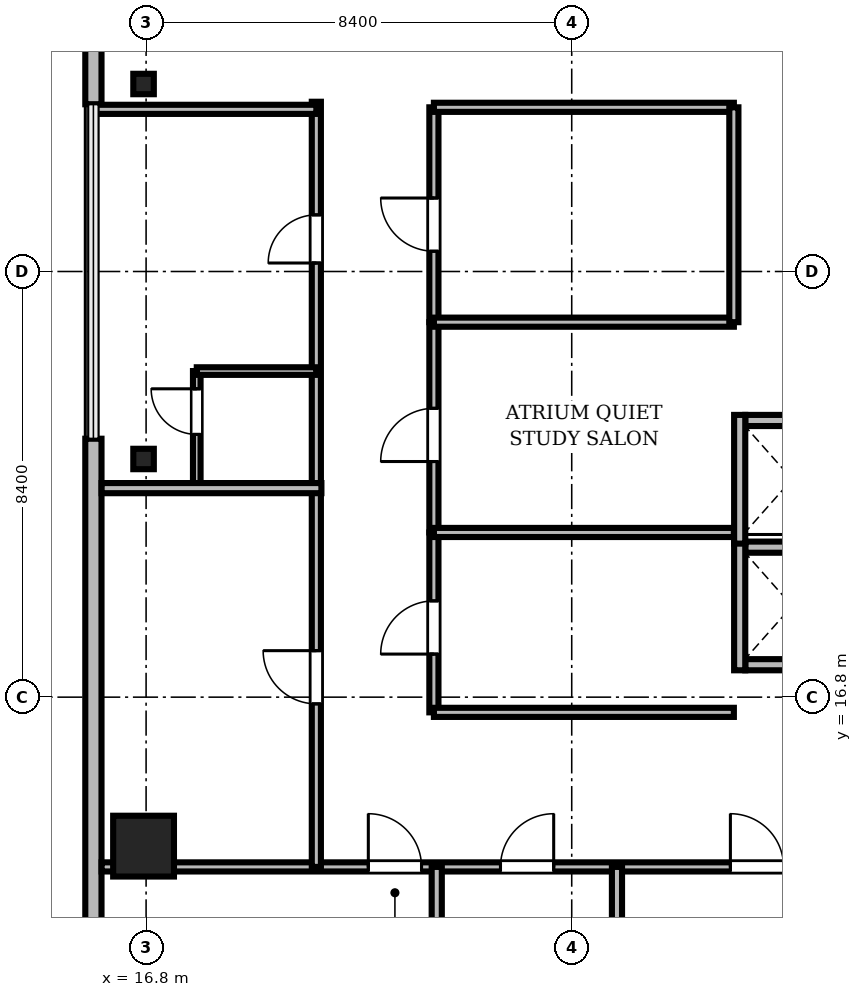
"""IFC4 building model, lengths in metres.
Left out: names, types, materials, properties, quantities, classifications, styles, units other than length and angle.
Written with IfcOpenShell. Run it as: python <this file> out.ifc"""

import sys

from ifc_helpers import new_model, si_unit, direction, frame, frame_2d, origin, origin_2d, place, context, subcontext, project, spatial, rectangle, i_section, extrude, source, transform, mapped, element, fill, save


model = new_model("IFC4")
c1 = context("Model", 3, precision=1e-05, world=origin(), true_north=direction((0.0, 1.0)))
c2 = subcontext(c1, "Body", "Model", "MODEL_VIEW")
j1 = project(units=[si_unit("LENGTHUNIT", "METRE"), si_unit("PLANEANGLEUNIT", "RADIAN")], contexts=[c1])
p1 = place(None, origin())
s1 = spatial("IfcSite", under=j1, at=p1, CompositionType="ELEMENT")
p2 = place(p1, origin())
s2 = spatial("IfcBuilding", under=s1, at=p2, CompositionType="ELEMENT")
p3 = place(p2, frame((0.0, 0.0, 242.7)))
s3 = spatial("IfcBuildingStorey", under=s2, at=p3, CompositionType="ELEMENT", Elevation=242.7)
m1 = source(origin(), c2, "Body", "SweptSolid", [
    extrude(rectangle(XDim=1.2, YDim=1.2, at=origin_2d()), origin(), (0.0, 0.0, 1.0), 3.73),
])
p4 = place(p3, frame((16.75, 13.86, 0.0), z_axis=(0.0, 0.0, 1.0), x_axis=(1.0, 0.0, 0.0)))
e1 = element("IfcColumn", 1, at=p4, inside=s3, PredefinedType="COLUMN", context=c2, shape_type="MappedRepresentation", body=[
    mapped(m1, transform((0.0, 0.0, 0.0), scale=1.0)),
])
m2 = source(origin(), c2, "Body", "SweptSolid", [
    extrude(i_section(OverallWidth=0.405, OverallDepth=0.403, WebThickness=0.018, FlangeThickness=0.028, FilletRadius=0.015, at=origin_2d()), origin(), (0.0, 0.0, 1.0), 3.73),
])
for number, where, z_axis, x_axis in (
    (2, (16.75, 28.9, 0.0), (0.0, 0.0, 1.0), (1.0, 0.0, 0.0)),
    (3, (16.75, 21.5, 0.0), (0.0, 0.0, 1.0), (1.0, 0.0, 0.0)),
):
    element("IfcColumn", number, at=place(p3, frame(where, z_axis=z_axis, x_axis=x_axis)), inside=s3, PredefinedType="COLUMN", context=c2, shape_type="MappedRepresentation", body=[
        mapped(m2, transform((0.0, 0.0, 0.0), scale=1.0)),
    ])
m3 = source(origin(), c2, "Body", "SweptSolid", [
    extrude(rectangle(XDim=15.6, YDim=0.32, at=frame_2d((7.8, 0.0))), origin(), (0.0, 0.0, 1.0), 3.73),
])
p5 = place(p3, frame((15.76, 44.1, 0.0), z_axis=(0.0, 0.0, 1.0), x_axis=(0.0, -1.0, 0.0)))
e4 = element("IfcWall", 4, at=p5, inside=s3, PredefinedType="SOLIDWALL", context=c2, shape_type="MappedRepresentation", body=[
    mapped(m3, transform((0.0, 0.0, 0.0), scale=1.0)),
])
m4 = source(origin(), c2, "Body", "SweptSolid", [
    extrude(rectangle(XDim=1.4, YDim=2.3, at=frame_2d((0.7, 1.15))), frame((0.0, 0.17, 0.0), z_axis=(0.0, -1.0, 0.0), x_axis=(1.0, 0.0, 0.0)), (0.0, 0.0, 1.0), 0.34),
])
p6 = place(p5, frame((9.61, 0.0, 0.0)))
e5 = element("IfcOpeningElement", 5, at=p6, cuts=e4, PredefinedType="OPENING", context=c2, shape_type="MappedRepresentation", body=[
    mapped(m4, transform((0.0, 0.0, 0.0), scale=1.0)),
])
m5 = source(origin(), c2, "Body", "SweptSolid", [
    extrude(rectangle(XDim=2.8, YDim=2.4, at=frame_2d((1.4, 1.2))), frame((0.0, 0.17, 0.0), z_axis=(0.0, -1.0, 0.0), x_axis=(1.0, 0.0, 0.0)), (0.0, 0.0, 1.0), 0.34),
])
p7 = place(p5, frame((2.705, 0.0, 0.72)))
e6 = element("IfcOpeningElement", 6, at=p7, cuts=e4, PredefinedType="OPENING", context=c2, shape_type="MappedRepresentation", body=[
    mapped(m5, transform((0.0, 0.0, 0.0), scale=1.0)),
])
m6 = source(origin(), c2, "Body", "SweptSolid", [
    extrude(rectangle(XDim=15.6, YDim=0.32, at=frame_2d((7.8, 0.0))), origin(), (0.0, 0.0, 1.0), 3.73),
])
p8 = place(p3, frame((15.76, 21.9, 0.0), z_axis=(0.0, 0.0, 1.0), x_axis=(0.0, -1.0, 0.0)))
e7 = element("IfcWall", 7, at=p8, inside=s3, PredefinedType="SOLIDWALL", context=c2, shape_type="MappedRepresentation", body=[
    mapped(m6, transform((0.0, 0.0, 0.0), scale=1.0)),
])
p9 = place(p8, frame((10.095, 0.0, 0.72)))
e8 = element("IfcOpeningElement", 8, at=p9, cuts=e7, PredefinedType="OPENING", context=c2, shape_type="MappedRepresentation", body=[
    mapped(m5, transform((0.0, 0.0, 0.0), scale=1.0)),
])
m7 = source(origin(), c2, "Body", "SweptSolid", [
    extrude(rectangle(XDim=1.85, YDim=0.22, at=frame_2d((0.925, 0.0))), origin(), (0.0, 0.0, 1.0), 3.73),
])
for number, where, z_axis, x_axis in (
    (9, (28.625, 17.44, 0.0), (0.0, 0.0, 1.0), (1.0, 0.0, 0.0)),
    (10, (28.625, 19.76, 0.0), (0.0, 0.0, 1.0), (1.0, 0.0, 0.0)),
):
    element("IfcWall", number, at=place(p3, frame(where, z_axis=z_axis, x_axis=x_axis)), inside=s3, PredefinedType="SOLIDWALL", context=c2, shape_type="MappedRepresentation", body=[
        mapped(m7, transform((0.0, 0.0, 0.0), scale=1.0)),
    ])
m8 = source(origin(), c2, "Body", "SweptSolid", [
    extrude(rectangle(XDim=2.54, YDim=0.22, at=frame_2d((1.27, 0.0))), origin(), (0.0, 0.0, 1.0), 3.73),
])
p10 = place(p3, frame((28.515, 17.33, 0.0), z_axis=(0.0, 0.0, 1.0), x_axis=(0.0, 1.0, 0.0)))
e11 = element("IfcWall", 11, at=p10, inside=s3, PredefinedType="SOLIDWALL", context=c2, shape_type="MappedRepresentation", body=[
    mapped(m8, transform((0.0, 0.0, 0.0), scale=1.0)),
])
p11 = place(p3, frame((28.625, 22.26, 0.0), z_axis=(0.0, 0.0, 1.0), x_axis=(1.0, 0.0, 0.0)))
e12 = element("IfcWall", 12, at=p11, inside=s3, PredefinedType="SOLIDWALL", context=c2, shape_type="MappedRepresentation", body=[
    mapped(m7, transform((0.0, 0.0, 0.0), scale=1.0)),
])
p12 = place(p3, frame((28.515, 19.83, 0.0), z_axis=(0.0, 0.0, 1.0), x_axis=(0.0, 1.0, 0.0)))
e13 = element("IfcWall", 13, at=p12, inside=s3, PredefinedType="SOLIDWALL", context=c2, shape_type="MappedRepresentation", body=[
    mapped(m8, transform((0.0, 0.0, 0.0), scale=1.0)),
])
m9 = source(origin(), c2, "Body", "SweptSolid", [
    extrude(rectangle(XDim=46.156, YDim=0.18, at=frame_2d((23.078, 0.0))), origin(), (0.0, 0.0, 1.0), 2.972),
])
p13 = place(p3, frame((15.922, 13.45, 0.0), z_axis=(0.0, 0.0, 1.0), x_axis=(1.0, 0.0, 0.0)))
e14 = element("IfcWall", 14, at=p13, inside=s3, PredefinedType="PARTITIONING", context=c2, shape_type="MappedRepresentation", body=[
    mapped(m9, transform((0.0, 0.0, 0.0), scale=1.0)),
])
m10 = source(origin(), c2, "Body", "SweptSolid", [
    extrude(rectangle(XDim=1.05, YDim=2.2, at=frame_2d((0.525, 1.1))), frame((0.0, 0.1, 0.0), z_axis=(0.0, -1.0, 0.0), x_axis=(1.0, 0.0, 0.0)), (0.0, 0.0, 1.0), 0.2),
])
p14 = place(p13, frame((5.264, 0.0, 0.0)))
e15 = element("IfcOpeningElement", 15, at=p14, cuts=e14, PredefinedType="OPENING", context=c2, shape_type="MappedRepresentation", body=[
    mapped(m10, transform((0.0, 0.0, 0.0), scale=1.0)),
])
p15 = place(p13, frame((7.872, 0.0, 0.0)))
e16 = element("IfcOpeningElement", 16, at=p15, cuts=e14, PredefinedType="OPENING", context=c2, shape_type="MappedRepresentation", body=[
    mapped(m10, transform((0.0, 0.0, 0.0), scale=1.0)),
])
p16 = place(p13, frame((12.409, 0.0, 0.0)))
e17 = element("IfcOpeningElement", 17, at=p16, cuts=e14, PredefinedType="OPENING", context=c2, shape_type="MappedRepresentation", body=[
    mapped(m10, transform((0.0, 0.0, 0.0), scale=1.0)),
])
m11 = source(origin(), c2, "Body", "SweptSolid", [
    extrude(rectangle(XDim=0.95, YDim=2.15, at=frame_2d((0.475, 1.075))), frame((0.0, 0.1, 0.0), z_axis=(0.0, -1.0, 0.0), x_axis=(1.0, 0.0, 0.0)), (0.0, 0.0, 1.0), 0.2),
])
p17 = place(p13, frame((18.691, 0.0, 0.0)))
e18 = element("IfcOpeningElement", 18, at=p17, cuts=e14, PredefinedType="OPENING", context=c2, shape_type="MappedRepresentation", body=[
    mapped(m11, transform((0.0, 0.0, 0.0), scale=1.0)),
])
p18 = place(p13, frame((23.518, 0.0, 0.0)))
e19 = element("IfcOpeningElement", 19, at=p18, cuts=e14, PredefinedType="OPENING", context=c2, shape_type="MappedRepresentation", body=[
    mapped(m11, transform((0.0, 0.0, 0.0), scale=1.0)),
])
p19 = place(p13, frame((28.1, 0.0, 0.0)))
e20 = element("IfcOpeningElement", 20, at=p19, cuts=e14, PredefinedType="OPENING", context=c2, shape_type="MappedRepresentation", body=[
    mapped(m10, transform((0.0, 0.0, 0.0), scale=1.0)),
])
p20 = place(p13, frame((32.998, 0.0, 0.0)))
e21 = element("IfcOpeningElement", 21, at=p20, cuts=e14, PredefinedType="OPENING", context=c2, shape_type="MappedRepresentation", body=[
    mapped(m10, transform((0.0, 0.0, 0.0), scale=1.0)),
])
m12 = source(origin(), c2, "Body", "SweptSolid", [
    extrude(rectangle(XDim=15.1, YDim=0.18, at=frame_2d((7.55, 0.0))), origin(), (0.0, 0.0, 1.0), 3.172),
])
p21 = place(p3, frame((20.16, 13.45, 0.0), z_axis=(0.0, 0.0, 1.0), x_axis=(0.0, 1.0, 0.0)))
e22 = element("IfcWall", 22, at=p21, inside=s3, PredefinedType="PARTITIONING", context=c2, shape_type="MappedRepresentation", body=[
    mapped(m12, transform((0.0, 0.0, 0.0), scale=1.0)),
])
p22 = place(p21, frame((3.218, 0.0, 0.0)))
e23 = element("IfcOpeningElement", 23, at=p22, cuts=e22, PredefinedType="OPENING", context=c2, shape_type="MappedRepresentation", body=[
    mapped(m10, transform((0.0, 0.0, 0.0), scale=1.0)),
])
p23 = place(p21, frame((11.917, 0.0, 0.0)))
e24 = element("IfcOpeningElement", 24, at=p23, cuts=e22, PredefinedType="OPENING", context=c2, shape_type="MappedRepresentation", body=[
    mapped(m11, transform((0.0, 0.0, 0.0), scale=1.0)),
])
m13 = source(origin(), c2, "Body", "SweptSolid", [
    extrude(rectangle(XDim=4.24, YDim=0.18, at=frame_2d((2.12, 0.0))), origin(), (0.0, 0.0, 1.0), 3.172),
])
p24 = place(p3, frame((22.48, 24.2, 0.0), z_axis=(0.0, 0.0, 1.0), x_axis=(0.0, 1.0, 0.0)))
e25 = element("IfcWall", 25, at=p24, inside=s3, PredefinedType="PARTITIONING", context=c2, shape_type="MappedRepresentation", body=[
    mapped(m13, transform((0.0, 0.0, 0.0), scale=1.0)),
])
p25 = place(p24, frame((1.4, 0.0, 0.0)))
e26 = element("IfcOpeningElement", 26, at=p25, cuts=e25, PredefinedType="OPENING", context=c2, shape_type="MappedRepresentation", body=[
    mapped(m10, transform((0.0, 0.0, 0.0), scale=1.0)),
])
m14 = source(origin(), c2, "Body", "SweptSolid", [
    extrude(rectangle(XDim=4.15, YDim=0.18, at=frame_2d((2.075, 0.0))), origin(), (0.0, 0.0, 1.0), 3.422),
])
p26 = place(p3, frame((22.48, 20.05, 0.0), z_axis=(0.0, 0.0, 1.0), x_axis=(0.0, 1.0, 0.0)))
e27 = element("IfcWall", 27, at=p26, inside=s3, PredefinedType="PARTITIONING", context=c2, shape_type="MappedRepresentation", body=[
    mapped(m14, transform((0.0, 0.0, 0.0), scale=1.0)),
])
p27 = place(p26, frame((1.4, 0.0, 0.0)))
e28 = element("IfcOpeningElement", 28, at=p27, cuts=e27, PredefinedType="OPENING", context=c2, shape_type="MappedRepresentation", body=[
    mapped(m10, transform((0.0, 0.0, 0.0), scale=1.0)),
])
m15 = source(origin(), c2, "Body", "SweptSolid", [
    extrude(rectangle(XDim=3.55, YDim=0.18, at=frame_2d((1.775, 0.0))), origin(), (0.0, 0.0, 1.0), 3.73),
])
p28 = place(p3, frame((22.48, 16.5, 0.0), z_axis=(0.0, 0.0, 1.0), x_axis=(0.0, 1.0, 0.0)))
e29 = element("IfcWall", 29, at=p28, inside=s3, PredefinedType="PARTITIONING", context=c2, shape_type="MappedRepresentation", body=[
    mapped(m15, transform((0.0, 0.0, 0.0), scale=1.0)),
])
p29 = place(p28, frame((1.15, 0.0, 0.0)))
e30 = element("IfcOpeningElement", 30, at=p29, cuts=e29, PredefinedType="OPENING", context=c2, shape_type="MappedRepresentation", body=[
    mapped(m10, transform((0.0, 0.0, 0.0), scale=1.0)),
])
m16 = source(origin(), c2, "Body", "SweptSolid", [
    extrude(rectangle(XDim=2.29, YDim=0.15, at=frame_2d((1.145, 0.0))), origin(), (0.0, 0.0, 1.0), 3.73),
])
p30 = place(p3, frame((17.8, 20.945, 0.0), z_axis=(0.0, 0.0, 1.0), x_axis=(0.0, 1.0, 0.0)))
e31 = element("IfcWall", 31, at=p30, inside=s3, PredefinedType="PARTITIONING", context=c2, shape_type="MappedRepresentation", body=[
    mapped(m16, transform((0.0, 0.0, 0.0), scale=1.0)),
])
m17 = source(origin(), c2, "Body", "SweptSolid", [
    extrude(rectangle(XDim=0.9, YDim=2.1, at=frame_2d((0.45, 1.05))), frame((0.0, 0.085, 0.0), z_axis=(0.0, -1.0, 0.0), x_axis=(1.0, 0.0, 0.0)), (0.0, 0.0, 1.0), 0.17),
])
p31 = place(p30, frame((1.04, 0.0, 0.0)))
e32 = element("IfcOpeningElement", 32, at=p31, cuts=e31, PredefinedType="OPENING", context=c2, shape_type="MappedRepresentation", body=[
    mapped(m17, transform((0.0, 0.0, 0.0), scale=1.0)),
])
m18 = source(origin(), c2, "Body", "SweptSolid", [
    extrude(rectangle(XDim=11.328, YDim=0.2, at=frame_2d((5.664, 0.0))), origin(), (0.0, 0.0, 1.0), 2.972),
])
for number, where, z_axis, x_axis in (
    (33, (22.536, 2.122, 0.0), (0.0, 0.0, 1.0), (0.0, 1.0, 0.0)),
    (34, (26.093, 2.122, 0.0), (0.0, 0.0, 1.0), (0.0, 1.0, 0.0)),
):
    element("IfcWall", number, at=place(p3, frame(where, z_axis=z_axis, x_axis=x_axis)), inside=s3, PredefinedType="PARTITIONING", context=c2, shape_type="MappedRepresentation", body=[
        mapped(m18, transform((0.0, 0.0, 0.0), scale=1.0)),
    ])
m19 = source(origin(), c2, "Body", "SweptSolid", [
    extrude(rectangle(XDim=5.92, YDim=0.18, at=frame_2d((2.96, 0.0))), origin(), (0.0, 0.0, 1.0), 3.73),
])
for number, where, z_axis, x_axis in (
    (35, (22.48, 16.5, 0.0), (0.0, 0.0, 1.0), (1.0, 0.0, 0.0)),
    (36, (22.48, 20.05, 0.0), (0.0, 0.0, 1.0), (1.0, 0.0, 0.0)),
    (37, (22.48, 24.2, 0.0), (0.0, 0.0, 1.0), (1.0, 0.0, 0.0)),
    (38, (22.48, 28.44, 0.0), (0.0, 0.0, 1.0), (1.0, 0.0, 0.0)),
):
    element("IfcWall", number, at=place(p3, frame(where, z_axis=z_axis, x_axis=x_axis)), inside=s3, PredefinedType="PARTITIONING", context=c2, shape_type="MappedRepresentation", body=[
        mapped(m19, transform((0.0, 0.0, 0.0), scale=1.0)),
    ])
m20 = source(origin(), c2, "Body", "SweptSolid", [
    extrude(rectangle(XDim=4.338, YDim=0.2, at=frame_2d((2.169, 0.0))), origin(), (0.0, 0.0, 1.0), 2.972),
])
p32 = place(p3, frame((15.922, 20.925, 0.0), z_axis=(0.0, 0.0, 1.0), x_axis=(1.0, 0.0, 0.0)))
e39 = element("IfcWall", 39, at=p32, inside=s3, PredefinedType="PARTITIONING", context=c2, shape_type="MappedRepresentation", body=[
    mapped(m20, transform((0.0, 0.0, 0.0), scale=1.0)),
])
m21 = source(origin(), c2, "Body", "SweptSolid", [
    extrude(rectangle(XDim=4.43, YDim=0.18, at=frame_2d((2.215, 0.0))), origin(), (0.0, 0.0, 1.0), 2.972),
])
p33 = place(p3, frame((15.73, 28.4, 0.0), z_axis=(0.0, 0.0, 1.0), x_axis=(1.0, 0.0, 0.0)))
e40 = element("IfcWall", 40, at=p33, inside=s3, PredefinedType="PARTITIONING", context=c2, shape_type="MappedRepresentation", body=[
    mapped(m21, transform((0.0, 0.0, 0.0), scale=1.0)),
])
p34 = place(p3, frame((28.4, 24.2, 0.0), z_axis=(0.0, 0.0, 1.0), x_axis=(0.0, 1.0, 0.0)))
e41 = element("IfcWall", 41, at=p34, inside=s3, PredefinedType="PARTITIONING", context=c2, shape_type="MappedRepresentation", body=[
    mapped(m13, transform((0.0, 0.0, 0.0), scale=1.0)),
])
m22 = source(origin(), c2, "Body", "SweptSolid", [
    extrude(rectangle(XDim=2.36, YDim=0.15, at=frame_2d((1.18, 0.0))), origin(), (0.0, 0.0, 1.0), 3.73),
])
p35 = place(p3, frame((17.8, 23.235, 0.0), z_axis=(0.0, 0.0, 1.0), x_axis=(1.0, 0.0, 0.0)))
e42 = element("IfcWall", 42, at=p35, inside=s3, PredefinedType="PARTITIONING", context=c2, shape_type="MappedRepresentation", body=[
    mapped(m22, transform((0.0, 0.0, 0.0), scale=1.0)),
])
m23 = source(origin(), c2, "Body", "SweptSolid", [
    extrude(rectangle(XDim=1.05, YDim=2.2, at=frame_2d((0.525, 1.1))), frame((0.0, 0.025, 0.0), z_axis=(0.0, -1.0, 0.0), x_axis=(1.0, 0.0, 0.0)), (0.0, 0.0, 1.0), 0.05),
])
p36 = place(p14, origin())
e43 = element("IfcDoor", 43, at=p36, inside=s3, OperationType="SINGLE_SWING_LEFT", PredefinedType="DOOR", context=c2, shape_type="MappedRepresentation", body=[
    mapped(m23, transform((0.0, 0.0, 0.0), scale=1.0)),
])
fill(e15, e43)
p37 = place(p15, origin())
e44 = element("IfcDoor", 44, at=p37, inside=s3, OperationType="SINGLE_SWING_RIGHT", PredefinedType="DOOR", context=c2, shape_type="MappedRepresentation", body=[
    mapped(m23, transform((0.0, 0.0, 0.0), scale=1.0)),
])
fill(e16, e44)
p38 = place(p16, origin())
e45 = element("IfcDoor", 45, at=p38, inside=s3, OperationType="SINGLE_SWING_LEFT", PredefinedType="DOOR", context=c2, shape_type="MappedRepresentation", body=[
    mapped(m23, transform((0.0, 0.0, 0.0), scale=1.0)),
])
fill(e17, e45)
p39 = place(p22, origin())
e46 = element("IfcDoor", 46, at=p39, inside=s3, OperationType="SINGLE_SWING_RIGHT", PredefinedType="DOOR", context=c2, shape_type="MappedRepresentation", body=[
    mapped(m23, transform((0.0, 0.0, 0.0), scale=1.0)),
])
fill(e23, e46)
m24 = source(origin(), c2, "Body", "SweptSolid", [
    extrude(rectangle(XDim=0.95, YDim=2.15, at=frame_2d((0.475, 1.075))), frame((0.0, 0.025, 0.0), z_axis=(0.0, -1.0, 0.0), x_axis=(1.0, 0.0, 0.0)), (0.0, 0.0, 1.0), 0.05),
])
p40 = place(p23, origin())
e47 = element("IfcDoor", 47, at=p40, inside=s3, OperationType="SINGLE_SWING_LEFT", PredefinedType="DOOR", context=c2, shape_type="MappedRepresentation", body=[
    mapped(m24, transform((0.0, 0.0, 0.0), scale=1.0)),
])
fill(e24, e47)
p41 = place(p25, origin())
e48 = element("IfcDoor", 48, at=p41, inside=s3, OperationType="SINGLE_SWING_RIGHT", PredefinedType="DOOR", context=c2, shape_type="MappedRepresentation", body=[
    mapped(m23, transform((0.0, 0.0, 0.0), scale=1.0)),
])
fill(e26, e48)
p42 = place(p27, origin())
e49 = element("IfcDoor", 49, at=p42, inside=s3, OperationType="SINGLE_SWING_LEFT", PredefinedType="DOOR", context=c2, shape_type="MappedRepresentation", body=[
    mapped(m23, transform((0.0, 0.0, 0.0), scale=1.0)),
])
fill(e28, e49)
p43 = place(p29, origin())
e50 = element("IfcDoor", 50, at=p43, inside=s3, OperationType="SINGLE_SWING_LEFT", PredefinedType="DOOR", context=c2, shape_type="MappedRepresentation", body=[
    mapped(m23, transform((0.0, 0.0, 0.0), scale=1.0)),
])
fill(e30, e50)
m25 = source(origin(), c2, "Body", "SweptSolid", [
    extrude(rectangle(XDim=0.9, YDim=2.1, at=frame_2d((0.45, 1.05))), frame((0.0, 0.025, 0.0), z_axis=(0.0, -1.0, 0.0), x_axis=(1.0, 0.0, 0.0)), (0.0, 0.0, 1.0), 0.05),
])
p44 = place(p31, origin())
e51 = element("IfcDoor", 51, at=p44, inside=s3, OperationType="SINGLE_SWING_RIGHT", PredefinedType="DOOR", context=c2, shape_type="MappedRepresentation", body=[
    mapped(m25, transform((0.0, 0.0, 0.0), scale=1.0)),
])
fill(e32, e51)
save(model, sys.argv[1])
